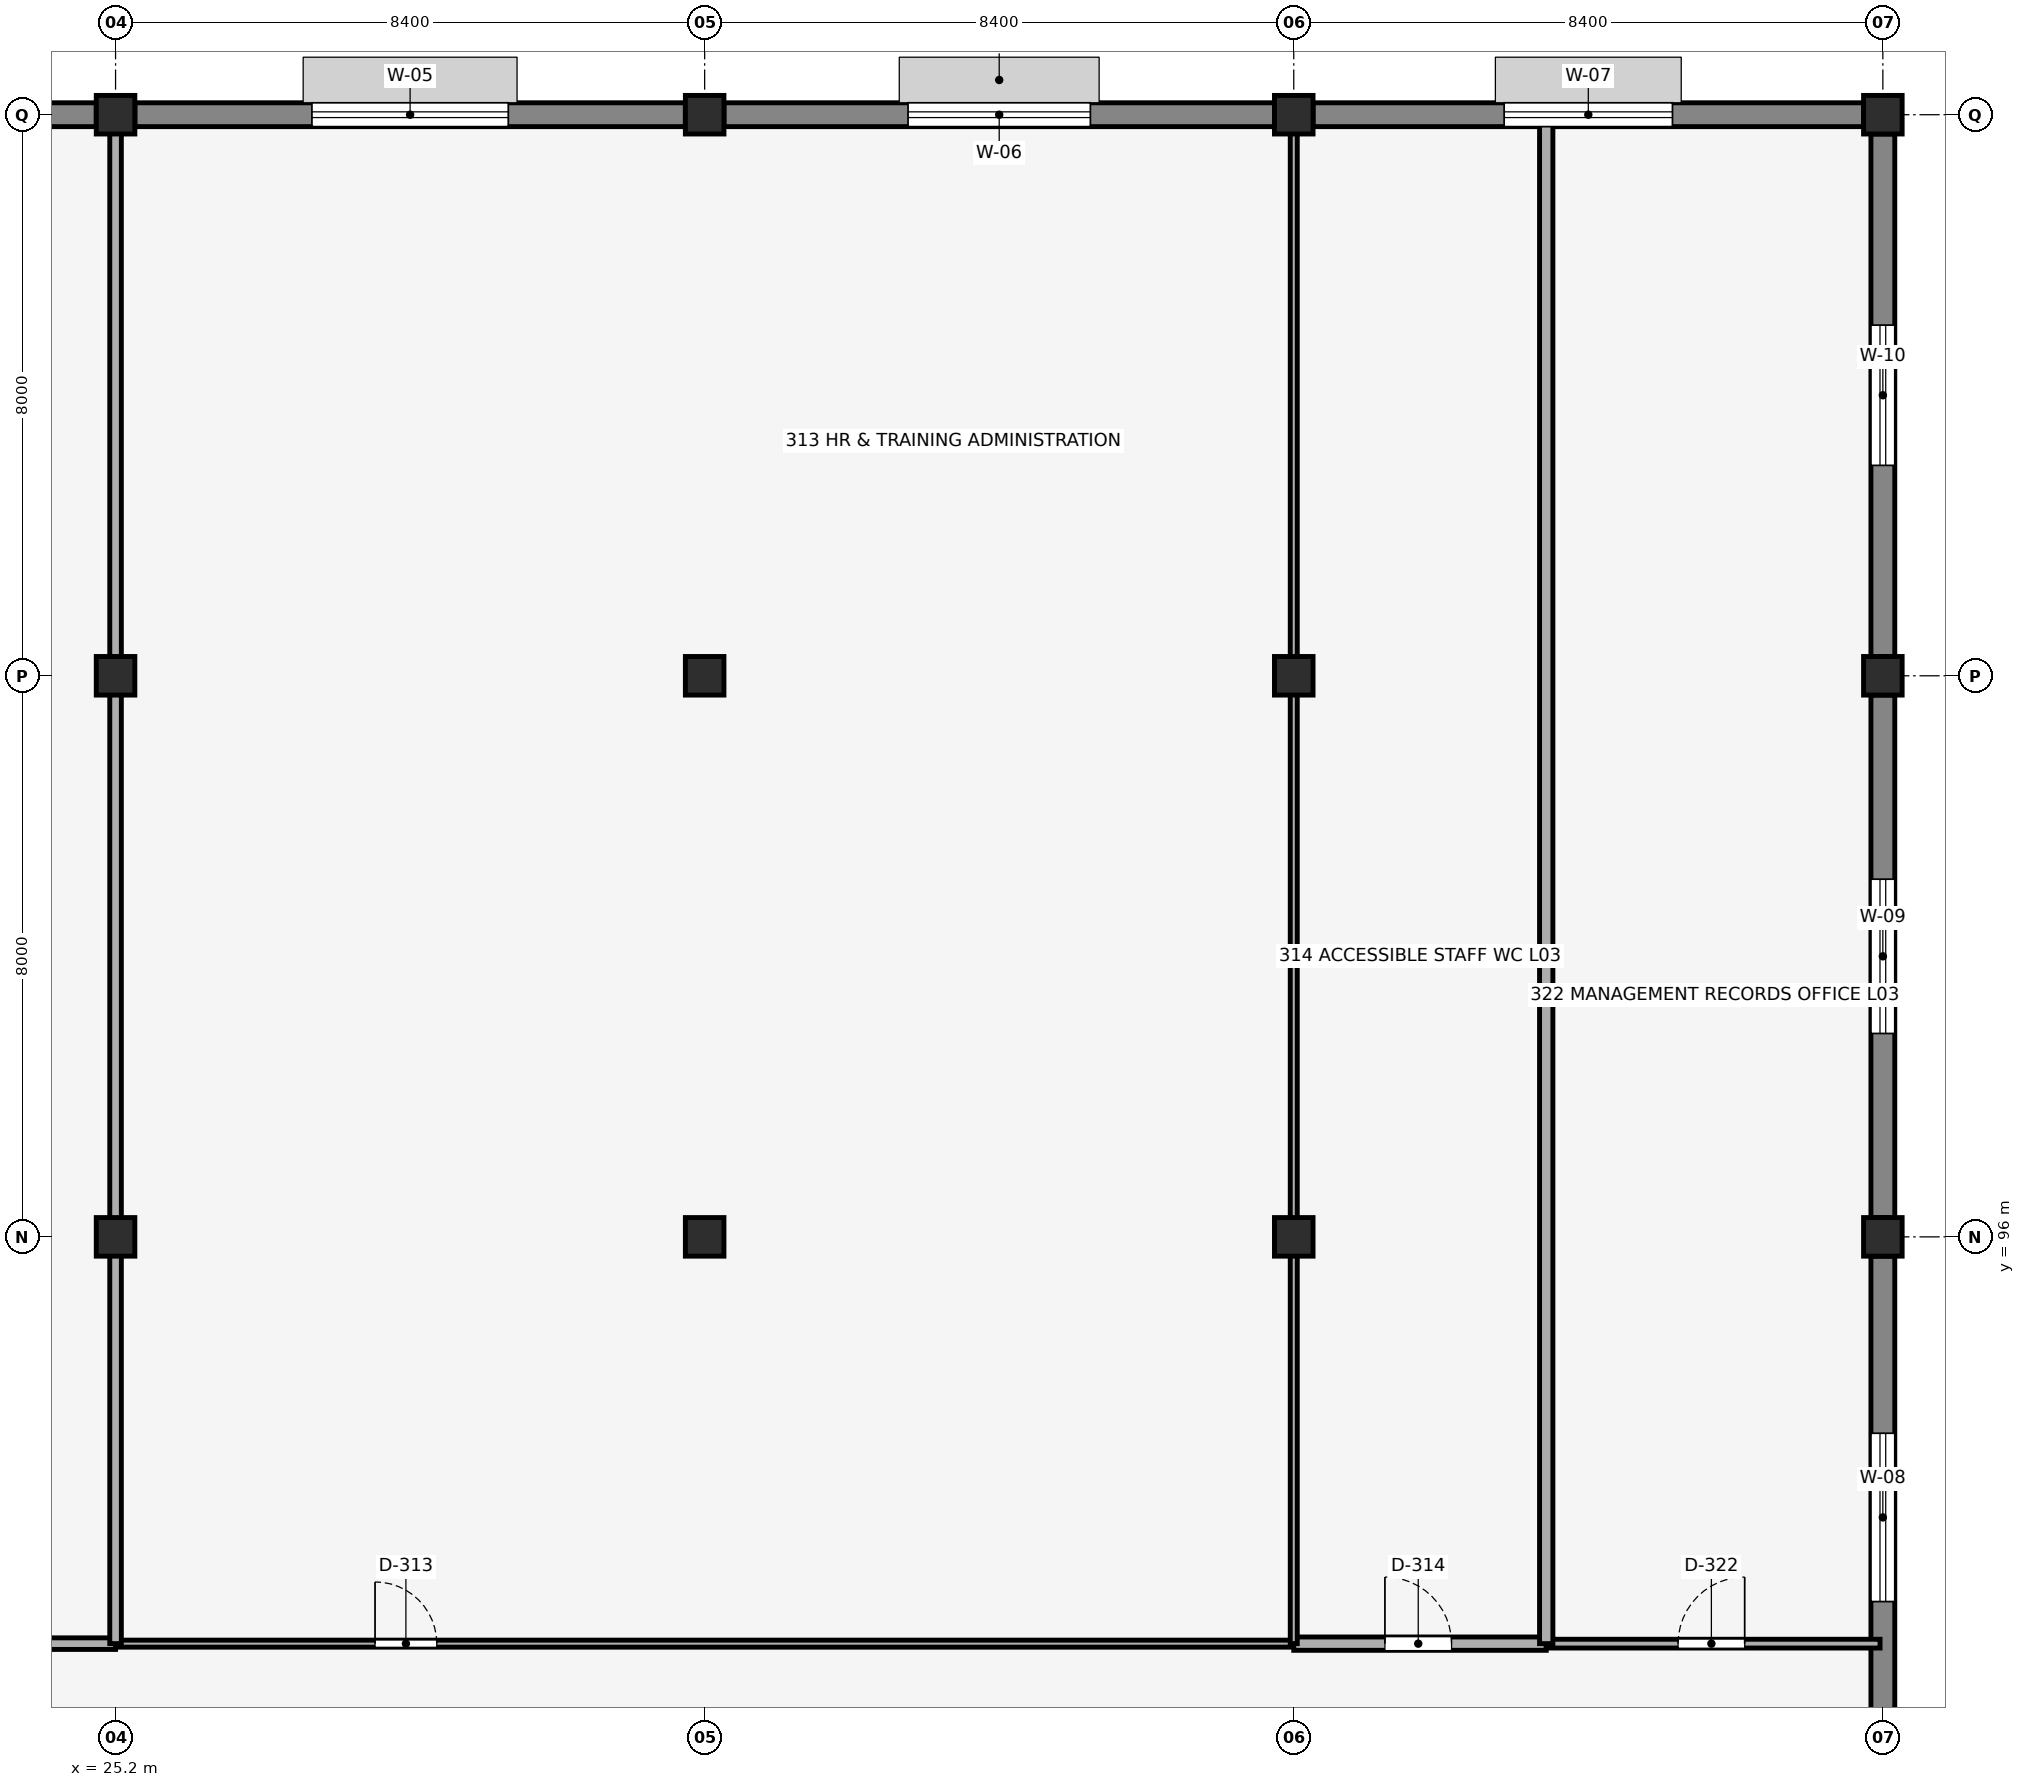
"""IFC4 building model, lengths in metres.
Left out: names, types, materials, properties, quantities, classifications, styles, units other than length and angle.
Written with IfcOpenShell. Run it as: python <this file> out.ifc"""

import sys

from ifc_helpers import new_model, si_unit, direction, frame, frame_2d, origin, origin_2d, place, context, subcontext, project, spatial, rectangle, extrude, element, fill, save


model = new_model("IFC4")
c1 = context("Model", 3, precision=1e-05, world=origin(), true_north=direction((0.0, 1.0)))
c2 = subcontext(c1, "Body", "Model", "MODEL_VIEW")
j1 = project(units=[si_unit("LENGTHUNIT", "METRE"), si_unit("PLANEANGLEUNIT", "RADIAN")], contexts=[c1])
p1 = place(None, origin())
s1 = spatial("IfcSite", under=j1, at=p1, CompositionType="ELEMENT")
p2 = place(p1, origin())
s2 = spatial("IfcBuilding", under=s1, at=p2, CompositionType="ELEMENT")
p3 = place(p2, frame((0.0, 0.0, 13.36)))
s3 = spatial("IfcBuildingStorey", under=s2, at=p3, CompositionType="ELEMENT", Elevation=13.36)
for number, where, z_axis, x_axis in (
    (1, (25.2, 96.0, 0.0), (0.0, 0.0, 1.0), (1.0, 0.0, 0.0)),
    (2, (25.2, 104.0, 0.0), (0.0, 0.0, 1.0), (1.0, 0.0, 0.0)),
    (3, (25.2, 112.0, 0.0), (0.0, 0.0, 1.0), (1.0, 0.0, 0.0)),
    (4, (33.6, 96.0, 0.0), (0.0, 0.0, 1.0), (1.0, 0.0, 0.0)),
    (5, (33.6, 104.0, 0.0), (0.0, 0.0, 1.0), (1.0, 0.0, 0.0)),
    (6, (33.6, 112.0, 0.0), (0.0, 0.0, 1.0), (1.0, 0.0, 0.0)),
    (7, (42.0, 96.0, 0.0), (0.0, 0.0, 1.0), (1.0, 0.0, 0.0)),
    (8, (42.0, 104.0, 0.0), (0.0, 0.0, 1.0), (1.0, 0.0, 0.0)),
    (9, (42.0, 112.0, 0.0), (0.0, 0.0, 1.0), (1.0, 0.0, 0.0)),
    (10, (50.4, 96.0, 0.0), (0.0, 0.0, 1.0), (1.0, 0.0, 0.0)),
    (11, (50.4, 104.0, 0.0), (0.0, 0.0, 1.0), (1.0, 0.0, 0.0)),
    (12, (50.4, 112.0, 0.0), (0.0, 0.0, 1.0), (1.0, 0.0, 0.0)),
):
    element("IfcColumn", number, at=place(p3, frame(where, z_axis=z_axis, x_axis=x_axis)), inside=s3, PredefinedType="COLUMN", context=c2, shape_type="SweptSolid", body=[
        extrude(rectangle(XDim=0.55, YDim=0.55, at=origin_2d()), origin(), (0.0, 0.0, 1.0), 3.58),
    ])
p4 = place(p3, frame((33.875, 112.0, 0.0), z_axis=(0.0, 0.0, 1.0), x_axis=(1.0, 0.0, 0.0)))
e13 = element("IfcWall", 13, at=p4, inside=s3, PredefinedType="SOLIDWALL", context=c2, shape_type="SweptSolid", body=[
    extrude(rectangle(XDim=7.85, YDim=0.34, at=frame_2d((3.925, 0.0))), origin(), (0.0, 0.0, 1.0), 3.28),
])
p5 = place(p4, frame((2.625, 0.0, 0.9), z_axis=(0.0, 0.0, 1.0), x_axis=(1.0, 0.0, 0.0)))
e14 = element("IfcOpeningElement", 14, at=p5, cuts=e13, PredefinedType="OPENING", context=c2, shape_type="SweptSolid", body=[
    extrude(rectangle(XDim=2.6, YDim=1.8, at=frame_2d((1.3, 0.9))), frame((0.0, 0.18, 0.0), z_axis=(0.0, -1.0, 0.0), x_axis=(1.0, 0.0, 0.0)), (0.0, 0.0, 1.0), 0.36),
])
p6 = place(p3, frame((42.275, 112.0, 0.0), z_axis=(0.0, 0.0, 1.0), x_axis=(1.0, 0.0, 0.0)))
e15 = element("IfcWall", 15, at=p6, inside=s3, PredefinedType="SOLIDWALL", context=c2, shape_type="SweptSolid", body=[
    extrude(rectangle(XDim=7.85, YDim=0.34, at=frame_2d((3.925, 0.0))), origin(), (0.0, 0.0, 1.0), 3.28),
])
p7 = place(p6, frame((2.725, 0.0, 0.9), z_axis=(0.0, 0.0, 1.0), x_axis=(1.0, 0.0, 0.0)))
e16 = element("IfcOpeningElement", 16, at=p7, cuts=e15, PredefinedType="OPENING", context=c2, shape_type="SweptSolid", body=[
    extrude(rectangle(XDim=2.4, YDim=1.75, at=frame_2d((1.2, 0.875))), frame((0.0, 0.18, 0.0), z_axis=(0.0, -1.0, 0.0), x_axis=(1.0, 0.0, 0.0)), (0.0, 0.0, 1.0), 0.36),
])
p8 = place(p3, frame((50.4, 88.275, 0.0), z_axis=(0.0, 0.0, 1.0), x_axis=(0.0, 1.0, 0.0)))
e17 = element("IfcWall", 17, at=p8, inside=s3, PredefinedType="SOLIDWALL", context=c2, shape_type="SweptSolid", body=[
    extrude(rectangle(XDim=7.45, YDim=0.34, at=frame_2d((3.725, 0.0))), origin(), (0.0, 0.0, 1.0), 3.28),
])
p9 = place(p8, frame((2.525, 0.0, 0.9), z_axis=(0.0, 0.0, 1.0), x_axis=(1.0, 0.0, 0.0)))
e18 = element("IfcOpeningElement", 18, at=p9, cuts=e17, PredefinedType="OPENING", context=c2, shape_type="SweptSolid", body=[
    extrude(rectangle(XDim=2.4, YDim=1.5, at=frame_2d((1.2, 0.75))), frame((0.0, 0.18, 0.0), z_axis=(0.0, -1.0, 0.0), x_axis=(1.0, 0.0, 0.0)), (0.0, 0.0, 1.0), 0.36),
])
p10 = place(p3, frame((50.4, 96.275, 0.0), z_axis=(0.0, 0.0, 1.0), x_axis=(0.0, 1.0, 0.0)))
e19 = element("IfcWall", 19, at=p10, inside=s3, PredefinedType="SOLIDWALL", context=c2, shape_type="SweptSolid", body=[
    extrude(rectangle(XDim=7.45, YDim=0.34, at=frame_2d((3.725, 0.0))), origin(), (0.0, 0.0, 1.0), 3.28),
])
p11 = place(p10, frame((2.625, 0.0, 0.9), z_axis=(0.0, 0.0, 1.0), x_axis=(1.0, 0.0, 0.0)))
e20 = element("IfcOpeningElement", 20, at=p11, cuts=e19, PredefinedType="OPENING", context=c2, shape_type="SweptSolid", body=[
    extrude(rectangle(XDim=2.2, YDim=1.5, at=frame_2d((1.1, 0.75))), frame((0.0, 0.18, 0.0), z_axis=(0.0, -1.0, 0.0), x_axis=(1.0, 0.0, 0.0)), (0.0, 0.0, 1.0), 0.36),
])
p12 = place(p3, frame((50.4, 104.275, 0.0), z_axis=(0.0, 0.0, 1.0), x_axis=(0.0, 1.0, 0.0)))
e21 = element("IfcWall", 21, at=p12, inside=s3, PredefinedType="SOLIDWALL", context=c2, shape_type="SweptSolid", body=[
    extrude(rectangle(XDim=7.45, YDim=0.34, at=frame_2d((3.725, 0.0))), origin(), (0.0, 0.0, 1.0), 3.28),
])
p13 = place(p12, frame((2.725, 0.0, 0.9), z_axis=(0.0, 0.0, 1.0), x_axis=(1.0, 0.0, 0.0)))
e22 = element("IfcOpeningElement", 22, at=p13, cuts=e21, PredefinedType="OPENING", context=c2, shape_type="SweptSolid", body=[
    extrude(rectangle(XDim=2.0, YDim=1.5, at=frame_2d((1.0, 0.75))), frame((0.0, 0.18, 0.0), z_axis=(0.0, -1.0, 0.0), x_axis=(1.0, 0.0, 0.0)), (0.0, 0.0, 1.0), 0.36),
])
p14 = place(p3, frame((17.075, 112.0, 0.0), z_axis=(0.0, 0.0, 1.0), x_axis=(1.0, 0.0, 0.0)))
e23 = element("IfcWall", 23, at=p14, inside=s3, PredefinedType="SOLIDWALL", context=c2, shape_type="SweptSolid", body=[
    extrude(rectangle(XDim=7.85, YDim=0.34, at=frame_2d((3.925, 0.0))), origin(), (0.0, 0.0, 1.0), 3.28),
])
p15 = place(p14, frame((2.425, 0.0, 0.9), z_axis=(0.0, 0.0, 1.0), x_axis=(1.0, 0.0, 0.0)))
e24 = element("IfcOpeningElement", 24, at=p15, cuts=e23, PredefinedType="OPENING", context=c2, shape_type="SweptSolid", body=[
    extrude(rectangle(XDim=3.0, YDim=1.65, at=frame_2d((1.5, 0.825))), frame((0.0, 0.18, 0.0), z_axis=(0.0, -1.0, 0.0), x_axis=(1.0, 0.0, 0.0)), (0.0, 0.0, 1.0), 0.36),
])
p16 = place(p3, frame((25.475, 112.0, 0.0), z_axis=(0.0, 0.0, 1.0), x_axis=(1.0, 0.0, 0.0)))
e25 = element("IfcWall", 25, at=p16, inside=s3, PredefinedType="SOLIDWALL", context=c2, shape_type="SweptSolid", body=[
    extrude(rectangle(XDim=7.85, YDim=0.34, at=frame_2d((3.925, 0.0))), origin(), (0.0, 0.0, 1.0), 3.28),
])
p17 = place(p16, frame((2.525, 0.0, 0.9), z_axis=(0.0, 0.0, 1.0), x_axis=(1.0, 0.0, 0.0)))
e26 = element("IfcOpeningElement", 26, at=p17, cuts=e25, PredefinedType="OPENING", context=c2, shape_type="SweptSolid", body=[
    extrude(rectangle(XDim=2.8, YDim=1.6, at=frame_2d((1.4, 0.8))), frame((0.0, 0.18, 0.0), z_axis=(0.0, -1.0, 0.0), x_axis=(1.0, 0.0, 0.0)), (0.0, 0.0, 1.0), 0.36),
])
p18 = place(p3, frame((16.8, 90.2, 0.0), z_axis=(0.0, 0.0, 1.0), x_axis=(1.0, 0.0, 0.0)))
e27 = element("IfcWall", 27, at=p18, inside=s3, PredefinedType="PARTITIONING", context=c2, shape_type="SweptSolid", body=[
    extrude(rectangle(XDim=8.4, YDim=0.165, at=frame_2d((4.2, 0.0))), origin(), (0.0, 0.0, 1.0), 3.58),
])
p19 = place(p18, frame((3.7, 0.0, 0.0), z_axis=(0.0, 0.0, 1.0), x_axis=(1.0, 0.0, 0.0)))
e28 = element("IfcOpeningElement", 28, at=p19, cuts=e27, PredefinedType="OPENING", context=c2, shape_type="SweptSolid", body=[
    extrude(rectangle(XDim=1.0, YDim=2.15, at=frame_2d((0.5, 1.075))), frame((0.0, 0.093, 0.0), z_axis=(0.0, -1.0, 0.0), x_axis=(1.0, 0.0, 0.0)), (0.0, 0.0, 1.0), 0.185),
])
p20 = place(p3, frame((25.2, 90.2, 0.0), z_axis=(0.0, 0.0, 1.0), x_axis=(1.0, 0.0, 0.0)))
e29 = element("IfcWall", 29, at=p20, inside=s3, PredefinedType="PARTITIONING", context=c2, shape_type="SweptSolid", body=[
    extrude(rectangle(XDim=16.8, YDim=0.1, at=frame_2d((8.4, 0.0))), origin(), (0.0, 0.0, 1.0), 3.58),
])
p21 = place(p20, frame((3.7, 0.0, 0.0), z_axis=(0.0, 0.0, 1.0), x_axis=(1.0, 0.0, 0.0)))
e30 = element("IfcOpeningElement", 30, at=p21, cuts=e29, PredefinedType="OPENING", context=c2, shape_type="SweptSolid", body=[
    extrude(rectangle(XDim=0.88, YDim=2.1, at=frame_2d((0.44, 1.05))), frame((0.0, 0.06, 0.0), z_axis=(0.0, -1.0, 0.0), x_axis=(1.0, 0.0, 0.0)), (0.0, 0.0, 1.0), 0.12),
])
p22 = place(p3, frame((42.0, 90.2, 0.0), z_axis=(0.0, 0.0, 1.0), x_axis=(1.0, 0.0, 0.0)))
e31 = element("IfcWall", 31, at=p22, inside=s3, PredefinedType="PLUMBINGWALL", context=c2, shape_type="SweptSolid", body=[
    extrude(rectangle(XDim=3.6, YDim=0.19, at=frame_2d((1.8, 0.0))), origin(), (0.0, 0.0, 1.0), 3.58),
])
p23 = place(p22, frame((1.3, 0.0, 0.0), z_axis=(0.0, 0.0, 1.0), x_axis=(1.0, 0.0, 0.0)))
e32 = element("IfcOpeningElement", 32, at=p23, cuts=e31, PredefinedType="OPENING", context=c2, shape_type="SweptSolid", body=[
    extrude(rectangle(XDim=0.95, YDim=2.15, at=frame_2d((0.475, 1.075))), frame((0.0, 0.105, 0.0), z_axis=(0.0, -1.0, 0.0), x_axis=(1.0, 0.0, 0.0)), (0.0, 0.0, 1.0), 0.21),
])
p24 = place(p3, frame((45.6, 90.2, 0.0), z_axis=(0.0, 0.0, 1.0), x_axis=(1.0, 0.0, 0.0)))
e33 = element("IfcWall", 33, at=p24, inside=s3, PredefinedType="PARTITIONING", context=c2, shape_type="SweptSolid", body=[
    extrude(rectangle(XDim=4.76, YDim=0.125, at=frame_2d((2.38, 0.0))), origin(), (0.0, 0.0, 1.0), 3.58),
])
p25 = place(p24, frame((1.88, 0.0, 0.0), z_axis=(0.0, 0.0, 1.0), x_axis=(1.0, 0.0, 0.0)))
e34 = element("IfcOpeningElement", 34, at=p25, cuts=e33, PredefinedType="OPENING", context=c2, shape_type="SweptSolid", body=[
    extrude(rectangle(XDim=0.95, YDim=2.15, at=frame_2d((0.475, 1.075))), frame((0.0, 0.073, 0.0), z_axis=(0.0, -1.0, 0.0), x_axis=(1.0, 0.0, 0.0)), (0.0, 0.0, 1.0), 0.145),
])
p26 = place(p3, frame((25.2, 90.2, 0.0), z_axis=(0.0, 0.0, 1.0), x_axis=(0.0, 1.0, 0.0)))
e35 = element("IfcWall", 35, at=p26, inside=s3, PredefinedType="PARTITIONING", context=c2, shape_type="SweptSolid", body=[
    extrude(rectangle(XDim=5.535, YDim=0.165, at=frame_2d((2.768, 0.0))), origin(), (0.0, 0.0, 1.0), 3.126),
])
for number, where, z_axis, x_axis in (
    (36, (25.2, 96.265, 0.0), (0.0, 0.0, 1.0), (0.0, 1.0, 0.0)),
    (37, (25.2, 104.265, 0.0), (0.0, 0.0, 1.0), (0.0, 1.0, 0.0)),
):
    element("IfcWall", number, at=place(p3, frame(where, z_axis=z_axis, x_axis=x_axis)), inside=s3, PredefinedType="PARTITIONING", context=c2, shape_type="SweptSolid", body=[
        extrude(rectangle(XDim=7.47, YDim=0.165, at=frame_2d((3.735, 0.0))), origin(), (0.0, 0.0, 1.0), 3.126),
    ])
p27 = place(p3, frame((42.0, 90.2, 0.0), z_axis=(0.0, 0.0, 1.0), x_axis=(0.0, 1.0, 0.0)))
e38 = element("IfcWall", 38, at=p27, inside=s3, PredefinedType="PARTITIONING", context=c2, shape_type="SweptSolid", body=[
    extrude(rectangle(XDim=5.535, YDim=0.1, at=frame_2d((2.768, 0.0))), origin(), (0.0, 0.0, 1.0), 3.126),
])
for number, where, z_axis, x_axis in (
    (39, (42.0, 96.265, 0.0), (0.0, 0.0, 1.0), (0.0, 1.0, 0.0)),
    (40, (42.0, 104.265, 0.0), (0.0, 0.0, 1.0), (0.0, 1.0, 0.0)),
):
    element("IfcWall", number, at=place(p3, frame(where, z_axis=z_axis, x_axis=x_axis)), inside=s3, PredefinedType="PARTITIONING", context=c2, shape_type="SweptSolid", body=[
        extrude(rectangle(XDim=7.47, YDim=0.1, at=frame_2d((3.735, 0.0))), origin(), (0.0, 0.0, 1.0), 3.126),
    ])
p28 = place(p3, frame((45.6, 90.2, 0.0), z_axis=(0.0, 0.0, 1.0), x_axis=(0.0, 1.0, 0.0)))
e41 = element("IfcWall", 41, at=p28, inside=s3, PredefinedType="PLUMBINGWALL", context=c2, shape_type="SweptSolid", body=[
    extrude(rectangle(XDim=21.76, YDim=0.19, at=frame_2d((10.88, 0.0))), origin(), (0.0, 0.0, 1.0), 3.58),
])
p29 = place(p5, origin())
e42 = element("IfcWindow", 42, at=p29, inside=s3, PartitioningType="DOUBLE_PANEL_VERTICAL", PredefinedType="WINDOW", context=c2, shape_type="SweptSolid", body=[
    extrude(rectangle(XDim=2.6, YDim=1.8, at=frame_2d((1.3, 0.9))), frame((0.0, 0.03, 0.0), z_axis=(0.0, -1.0, 0.0), x_axis=(1.0, 0.0, 0.0)), (0.0, 0.0, 1.0), 0.06),
])
fill(e14, e42)
p30 = place(p7, origin())
e43 = element("IfcWindow", 43, at=p30, inside=s3, PartitioningType="DOUBLE_PANEL_VERTICAL", PredefinedType="WINDOW", context=c2, shape_type="SweptSolid", body=[
    extrude(rectangle(XDim=2.4, YDim=1.75, at=frame_2d((1.2, 0.875))), frame((0.0, 0.03, 0.0), z_axis=(0.0, -1.0, 0.0), x_axis=(1.0, 0.0, 0.0)), (0.0, 0.0, 1.0), 0.06),
])
fill(e16, e43)
p31 = place(p9, origin())
e44 = element("IfcWindow", 44, at=p31, inside=s3, PartitioningType="DOUBLE_PANEL_VERTICAL", PredefinedType="WINDOW", context=c2, shape_type="SweptSolid", body=[
    extrude(rectangle(XDim=2.4, YDim=1.5, at=frame_2d((1.2, 0.75))), frame((0.0, 0.03, 0.0), z_axis=(0.0, -1.0, 0.0), x_axis=(1.0, 0.0, 0.0)), (0.0, 0.0, 1.0), 0.06),
])
fill(e18, e44)
p32 = place(p11, origin())
e45 = element("IfcWindow", 45, at=p32, inside=s3, PartitioningType="DOUBLE_PANEL_VERTICAL", PredefinedType="WINDOW", context=c2, shape_type="SweptSolid", body=[
    extrude(rectangle(XDim=2.2, YDim=1.5, at=frame_2d((1.1, 0.75))), frame((0.0, 0.03, 0.0), z_axis=(0.0, -1.0, 0.0), x_axis=(1.0, 0.0, 0.0)), (0.0, 0.0, 1.0), 0.06),
])
fill(e20, e45)
p33 = place(p13, origin())
e46 = element("IfcWindow", 46, at=p33, inside=s3, PartitioningType="DOUBLE_PANEL_VERTICAL", PredefinedType="WINDOW", context=c2, shape_type="SweptSolid", body=[
    extrude(rectangle(XDim=2.0, YDim=1.5, at=frame_2d((1.0, 0.75))), frame((0.0, 0.03, 0.0), z_axis=(0.0, -1.0, 0.0), x_axis=(1.0, 0.0, 0.0)), (0.0, 0.0, 1.0), 0.06),
])
fill(e22, e46)
p34 = place(p17, origin())
e47 = element("IfcWindow", 47, at=p34, inside=s3, PartitioningType="DOUBLE_PANEL_VERTICAL", PredefinedType="WINDOW", context=c2, shape_type="SweptSolid", body=[
    extrude(rectangle(XDim=2.8, YDim=1.6, at=frame_2d((1.4, 0.8))), frame((0.0, 0.03, 0.0), z_axis=(0.0, -1.0, 0.0), x_axis=(1.0, 0.0, 0.0)), (0.0, 0.0, 1.0), 0.06),
])
fill(e26, e47)
p35 = place(p21, origin())
e48 = element("IfcDoor", 48, at=p35, inside=s3, OperationType="SINGLE_SWING_LEFT", PredefinedType="DOOR", context=c2, shape_type="SweptSolid", body=[
    extrude(rectangle(XDim=0.88, YDim=2.1, at=frame_2d((0.44, 1.05))), frame((0.0, 0.025, 0.0), z_axis=(0.0, -1.0, 0.0), x_axis=(1.0, 0.0, 0.0)), (0.0, 0.0, 1.0), 0.05),
])
fill(e30, e48)
p36 = place(p23, origin())
e49 = element("IfcDoor", 49, at=p36, inside=s3, OperationType="SINGLE_SWING_LEFT", PredefinedType="DOOR", context=c2, shape_type="SweptSolid", body=[
    extrude(rectangle(XDim=0.95, YDim=2.15, at=frame_2d((0.475, 1.075))), frame((0.0, 0.025, 0.0), z_axis=(0.0, -1.0, 0.0), x_axis=(1.0, 0.0, 0.0)), (0.0, 0.0, 1.0), 0.05),
])
fill(e32, e49)
p37 = place(p25, origin())
e50 = element("IfcDoor", 50, at=p37, inside=s3, OperationType="SINGLE_SWING_RIGHT", PredefinedType="DOOR", context=c2, shape_type="SweptSolid", body=[
    extrude(rectangle(XDim=0.95, YDim=2.15, at=frame_2d((0.475, 1.075))), frame((0.0, 0.025, 0.0), z_axis=(0.0, -1.0, 0.0), x_axis=(1.0, 0.0, 0.0)), (0.0, 0.0, 1.0), 0.05),
])
fill(e34, e50)
save(model, sys.argv[1])
